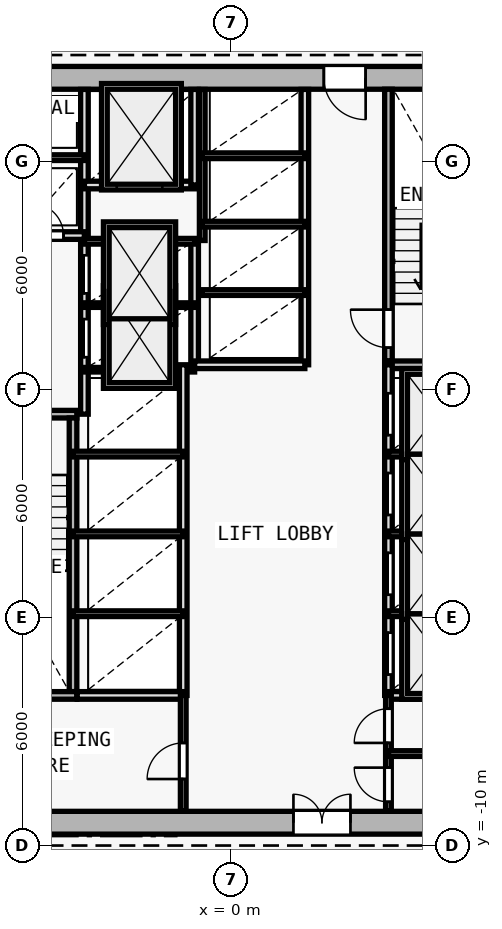
"""IFC4 building model, lengths in metres.
Left out: names, types, materials, properties, quantities, classifications, styles, units other than length and angle.
Written with IfcOpenShell. Run it as: python <this file> out.ifc"""

import sys

from ifc_helpers import new_model, si_unit, direction, frame, frame_2d, origin, origin_2d, place, context, subcontext, project, spatial, rectangle, i_section, extrude, element, fill, save


model = new_model("IFC4")
c1 = context("Model", 3, precision=1e-05, world=origin(), true_north=direction((0.0, 1.0)))
c2 = subcontext(c1, "Body", "Model", "MODEL_VIEW")
j1 = project(units=[si_unit("LENGTHUNIT", "METRE"), si_unit("PLANEANGLEUNIT", "RADIAN")], contexts=[c1])
p1 = place(None, origin())
s1 = spatial("IfcSite", under=j1, at=p1, CompositionType="ELEMENT")
p2 = place(p1, origin())
s2 = spatial("IfcBuilding", under=s1, at=p2, CompositionType="ELEMENT")
p3 = place(p2, frame((0.0, 0.0, 48.0)))
s3 = spatial("IfcBuildingStorey", under=s2, at=p3, CompositionType="ELEMENT", Elevation=48.0)
p4 = place(p3, frame((0.0, -9.4, 0.0), z_axis=(0.0, 0.0, 1.0), x_axis=(1.0, 0.0, 0.0)))
e1 = element("IfcColumn", 1, at=p4, inside=s3, PredefinedType="COLUMN", context=c2, shape_type="SweptSolid", body=[
    extrude(i_section(OverallWidth=0.416, OverallDepth=0.446, WebThickness=0.025, FlangeThickness=0.04, FilletRadius=0.015, at=origin_2d()), origin(), (0.0, 0.0, 1.0), 3.6),
])
p5 = place(p3, frame((-8.0, -9.4, 0.0), z_axis=(0.0, 0.0, 1.0), x_axis=(1.0, 0.0, 0.0)))
e2 = element("IfcWall", 2, at=p5, inside=s3, PredefinedType="SHEAR", context=c2, shape_type="SweptSolid", body=[
    extrude(rectangle(XDim=16.0, YDim=0.6, at=frame_2d((8.0, 0.0))), origin(), (0.0, 0.0, 1.0), 3.35),
])
p6 = place(p5, frame((9.65, 0.0, 0.0)))
e3 = element("IfcOpeningElement", 3, at=p6, cuts=e2, PredefinedType="OPENING", context=c2, shape_type="SweptSolid", body=[
    extrude(rectangle(XDim=1.5, YDim=2.2, at=frame_2d((0.75, 1.1))), frame((0.0, 0.31, 0.0), z_axis=(0.0, -1.0, 0.0), x_axis=(1.0, 0.0, 0.0)), (0.0, 0.0, 1.0), 0.62),
])
p7 = place(p3, frame((8.0, 10.2, 0.0), z_axis=(0.0, 0.0, 1.0), x_axis=(-1.0, 0.0, 0.0)))
e4 = element("IfcWall", 4, at=p7, inside=s3, PredefinedType="SHEAR", context=c2, shape_type="SweptSolid", body=[
    extrude(rectangle(XDim=16.0, YDim=0.6, at=frame_2d((8.0, 0.0))), origin(), (0.0, 0.0, 1.0), 3.35),
])
p8 = place(p7, frame((4.45, 0.0, 0.0)))
e5 = element("IfcOpeningElement", 5, at=p8, cuts=e4, PredefinedType="OPENING", context=c2, shape_type="SweptSolid", body=[
    extrude(rectangle(XDim=1.1, YDim=2.15, at=frame_2d((0.55, 1.075))), frame((0.0, 0.31, 0.0), z_axis=(0.0, -1.0, 0.0), x_axis=(1.0, 0.0, 0.0)), (0.0, 0.0, 1.0), 0.62),
])
p9 = place(p3, frame((-7.4, 1.35, 0.0), z_axis=(0.0, 0.0, 1.0), x_axis=(1.0, 0.0, 0.0)))
e6 = element("IfcWall", 6, at=p9, inside=s3, PredefinedType="SOLIDWALL", context=c2, shape_type="SweptSolid", body=[
    extrude(rectangle(XDim=3.35, YDim=0.2, at=frame_2d((1.675, 0.0))), origin(), (0.0, 0.0, 1.0), 3.35),
])
p10 = place(p9, frame((0.65, 0.0, 0.0)))
e7 = element("IfcOpeningElement", 7, at=p10, cuts=e6, PredefinedType="OPENING", context=c2, shape_type="SweptSolid", body=[
    extrude(rectangle(XDim=1.0, YDim=2.15, at=frame_2d((0.5, 1.075))), frame((0.0, 0.11, 0.0), z_axis=(0.0, -1.0, 0.0), x_axis=(1.0, 0.0, 0.0)), (0.0, 0.0, 1.0), 0.22),
])
p11 = place(p3, frame((-4.15, -5.95, 0.0), z_axis=(0.0, 0.0, 1.0), x_axis=(0.0, 1.0, 0.0)))
e8 = element("IfcWall", 8, at=p11, inside=s3, PredefinedType="SOLIDWALL", context=c2, shape_type="SweptSolid", body=[
    extrude(rectangle(XDim=7.2, YDim=0.2, at=frame_2d((3.6, 0.0))), origin(), (0.0, 0.0, 1.0), 3.35),
])
p12 = place(p3, frame((-3.85, 1.35, 0.0), z_axis=(0.0, 0.0, 1.0), x_axis=(0.0, 1.0, 0.0)))
e9 = element("IfcWall", 9, at=p12, inside=s3, PredefinedType="SOLIDWALL", context=c2, shape_type="SweptSolid", body=[
    extrude(rectangle(XDim=8.545, YDim=0.2, at=frame_2d((4.272, 0.0))), origin(), (0.0, 0.0, 1.0), 3.35),
])
p13 = place(p12, frame((1.5, 0.0, 0.0)))
e10 = element("IfcOpeningElement", 10, at=p13, cuts=e9, PredefinedType="OPENING", context=c2, shape_type="SweptSolid", body=[
    extrude(rectangle(XDim=1.0, YDim=2.15, at=frame_2d((0.5, 1.075))), frame((0.0, 0.11, 0.0), z_axis=(0.0, -1.0, 0.0), x_axis=(1.0, 0.0, 0.0)), (0.0, 0.0, 1.0), 0.22),
])
p14 = place(p12, frame((3.18, 0.0, 0.0)))
e11 = element("IfcOpeningElement", 11, at=p14, cuts=e9, PredefinedType="OPENING", context=c2, shape_type="SweptSolid", body=[
    extrude(rectangle(XDim=1.0, YDim=2.15, at=frame_2d((0.5, 1.075))), frame((0.0, 0.11, 0.0), z_axis=(0.0, -1.0, 0.0), x_axis=(1.0, 0.0, 0.0)), (0.0, 0.0, 1.0), 0.22),
])
p15 = place(p3, frame((-7.395, 6.05, 0.0), z_axis=(0.0, 0.0, 1.0), x_axis=(1.0, 0.0, 0.0)))
e12 = element("IfcWall", 12, at=p15, inside=s3, PredefinedType="SOLIDWALL", context=c2, shape_type="SweptSolid", body=[
    extrude(rectangle(XDim=3.545, YDim=0.2, at=frame_2d((1.772, 0.0))), origin(), (0.0, 0.0, 1.0), 3.35),
])
p16 = place(p15, frame((0.345, 0.0, 0.0)))
e13 = element("IfcOpeningElement", 13, at=p16, cuts=e12, PredefinedType="OPENING", context=c2, shape_type="SweptSolid", body=[
    extrude(rectangle(XDim=0.85, YDim=2.1, at=frame_2d((0.425, 1.05))), frame((0.0, 0.11, 0.0), z_axis=(0.0, -1.0, 0.0), x_axis=(1.0, 0.0, 0.0)), (0.0, 0.0, 1.0), 0.22),
])
p17 = place(p15, frame((2.145, 0.0, 0.0)))
e14 = element("IfcOpeningElement", 14, at=p17, cuts=e12, PredefinedType="OPENING", context=c2, shape_type="SweptSolid", body=[
    extrude(rectangle(XDim=0.85, YDim=2.1, at=frame_2d((0.425, 1.05))), frame((0.0, 0.11, 0.0), z_axis=(0.0, -1.0, 0.0), x_axis=(1.0, 0.0, 0.0)), (0.0, 0.0, 1.0), 0.22),
])
p18 = place(p3, frame((-7.395, 8.1, 0.0), z_axis=(0.0, 0.0, 1.0), x_axis=(1.0, 0.0, 0.0)))
e15 = element("IfcWall", 15, at=p18, inside=s3, PredefinedType="PARTITIONING", context=c2, shape_type="SweptSolid", body=[
    extrude(rectangle(XDim=3.545, YDim=0.15, at=frame_2d((1.772, 0.0))), origin(), (0.0, 0.0, 1.0), 3.35),
])
p19 = place(p3, frame((4.15, 2.75, 0.0), z_axis=(0.0, 0.0, 1.0), x_axis=(0.0, 1.0, 0.0)))
e16 = element("IfcWall", 16, at=p19, inside=s3, PredefinedType="SOLIDWALL", context=c2, shape_type="SweptSolid", body=[
    extrude(rectangle(XDim=7.15, YDim=0.2, at=frame_2d((3.575, 0.0))), origin(), (0.0, 0.0, 1.0), 3.35),
])
p20 = place(p19, frame((0.35, 0.0, 0.0)))
e17 = element("IfcOpeningElement", 17, at=p20, cuts=e16, PredefinedType="OPENING", context=c2, shape_type="SweptSolid", body=[
    extrude(rectangle(XDim=1.0, YDim=2.15, at=frame_2d((0.5, 1.075))), frame((0.0, 0.11, 0.0), z_axis=(0.0, -1.0, 0.0), x_axis=(1.0, 0.0, 0.0)), (0.0, 0.0, 1.0), 0.22),
])
p21 = place(p3, frame((4.05, 2.65, 0.0), z_axis=(0.0, 0.0, 1.0), x_axis=(1.0, 0.0, 0.0)))
e18 = element("IfcWall", 18, at=p21, inside=s3, PredefinedType="SOLIDWALL", context=c2, shape_type="SweptSolid", body=[
    extrude(rectangle(XDim=3.35, YDim=0.2, at=frame_2d((1.675, 0.0))), origin(), (0.0, 0.0, 1.0), 3.35),
])
p22 = place(p3, frame((-0.95, 2.65, 0.0), z_axis=(0.0, 0.0, 1.0), x_axis=(0.0, 1.0, 0.0)))
e19 = element("IfcWall", 19, at=p22, inside=s3, PredefinedType="SOLIDWALL", context=c2, shape_type="SweptSolid", body=[
    extrude(rectangle(XDim=3.27, YDim=0.2, at=frame_2d((1.635, 0.0))), origin(), (0.0, 0.0, 1.0), 3.35),
])
for number, where, z_axis, x_axis in (
    (20, (-3.85, 2.52, 0.0), (0.0, 0.0, 1.0), (1.0, 0.0, 0.0)),
    (21, (-3.85, 4.22, 0.0), (0.0, 0.0, 1.0), (1.0, 0.0, 0.0)),
):
    element("IfcWall", number, at=place(p3, frame(where, z_axis=z_axis, x_axis=x_axis)), inside=s3, PredefinedType="PARTITIONING", context=c2, shape_type="SweptSolid", body=[
        extrude(rectangle(XDim=2.9, YDim=0.12, at=frame_2d((1.45, 0.0))), origin(), (0.0, 0.0, 1.0), 3.35),
    ])
p23 = place(p3, frame((-3.85, 5.9, 0.0), z_axis=(0.0, 0.0, 1.0), x_axis=(1.0, 0.0, 0.0)))
e22 = element("IfcWall", 22, at=p23, inside=s3, PredefinedType="PARTITIONING", context=c2, shape_type="SweptSolid", body=[
    extrude(rectangle(XDim=2.9, YDim=0.15, at=frame_2d((1.45, 0.0))), origin(), (0.0, 0.0, 1.0), 3.35),
])
p24 = place(p3, frame((-3.85, 7.38, 0.0), z_axis=(0.0, 0.0, 1.0), x_axis=(1.0, 0.0, 0.0)))
e23 = element("IfcWall", 23, at=p24, inside=s3, PredefinedType="SOLIDWALL", context=c2, shape_type="SweptSolid", body=[
    extrude(rectangle(XDim=2.9, YDim=0.2, at=frame_2d((1.45, 0.0))), origin(), (0.0, 0.0, 1.0), 3.35),
])
p25 = place(p24, frame((0.85, 0.0, 0.0)))
e24 = element("IfcOpeningElement", 24, at=p25, cuts=e23, PredefinedType="OPENING", context=c2, shape_type="SweptSolid", body=[
    extrude(rectangle(XDim=1.2, YDim=2.2, at=frame_2d((0.6, 1.1))), frame((0.0, 0.11, 0.0), z_axis=(0.0, -1.0, 0.0), x_axis=(1.0, 0.0, 0.0)), (0.0, 0.0, 1.0), 0.22),
])
p26 = place(p3, frame((-0.95, 7.38, 0.0), z_axis=(0.0, 0.0, 1.0), x_axis=(0.0, 1.0, 0.0)))
e25 = element("IfcWall", 25, at=p26, inside=s3, PredefinedType="SOLIDWALL", context=c2, shape_type="SweptSolid", body=[
    extrude(rectangle(XDim=2.515, YDim=0.2, at=frame_2d((1.258, 0.0))), origin(), (0.0, 0.0, 1.0), 3.35),
])
p27 = place(p3, frame((4.15, -6.05, 0.0), z_axis=(0.0, 0.0, 1.0), x_axis=(0.0, 1.0, 0.0)))
e26 = element("IfcWall", 26, at=p27, inside=s3, PredefinedType="SOLIDWALL", context=c2, shape_type="SweptSolid", body=[
    extrude(rectangle(XDim=8.7, YDim=0.2, at=frame_2d((4.35, 0.0))), origin(), (0.0, 0.0, 1.0), 3.35),
])
p28 = place(p27, frame((0.55, 0.0, 0.0)))
e27 = element("IfcOpeningElement", 27, at=p28, cuts=e26, PredefinedType="OPENING", context=c2, shape_type="SweptSolid", body=[
    extrude(rectangle(XDim=1.1, YDim=2.15, at=frame_2d((0.55, 1.075))), frame((0.0, 0.11, 0.0), z_axis=(0.0, -1.0, 0.0), x_axis=(1.0, 0.0, 0.0)), (0.0, 0.0, 1.0), 0.22),
])
p29 = place(p27, frame((2.65, 0.0, 0.0)))
e28 = element("IfcOpeningElement", 28, at=p29, cuts=e26, PredefinedType="OPENING", context=c2, shape_type="SweptSolid", body=[
    extrude(rectangle(XDim=1.1, YDim=2.15, at=frame_2d((0.55, 1.075))), frame((0.0, 0.11, 0.0), z_axis=(0.0, -1.0, 0.0), x_axis=(1.0, 0.0, 0.0)), (0.0, 0.0, 1.0), 0.22),
])
p30 = place(p27, frame((4.75, 0.0, 0.0)))
e29 = element("IfcOpeningElement", 29, at=p30, cuts=e26, PredefinedType="OPENING", context=c2, shape_type="SweptSolid", body=[
    extrude(rectangle(XDim=1.1, YDim=2.15, at=frame_2d((0.55, 1.075))), frame((0.0, 0.11, 0.0), z_axis=(0.0, -1.0, 0.0), x_axis=(1.0, 0.0, 0.0)), (0.0, 0.0, 1.0), 0.22),
])
p31 = place(p27, frame((6.85, 0.0, 0.0)))
e30 = element("IfcOpeningElement", 30, at=p31, cuts=e26, PredefinedType="OPENING", context=c2, shape_type="SweptSolid", body=[
    extrude(rectangle(XDim=1.1, YDim=2.15, at=frame_2d((0.55, 1.075))), frame((0.0, 0.11, 0.0), z_axis=(0.0, -1.0, 0.0), x_axis=(1.0, 0.0, 0.0)), (0.0, 0.0, 1.0), 0.22),
])
for number, where, z_axis, x_axis in (
    (31, (4.15, -3.9, 0.0), (0.0, 0.0, 1.0), (1.0, 0.0, 0.0)),
    (32, (4.15, -1.8, 0.0), (0.0, 0.0, 1.0), (1.0, 0.0, 0.0)),
    (33, (4.15, 0.3, 0.0), (0.0, 0.0, 1.0), (1.0, 0.0, 0.0)),
):
    element("IfcWall", number, at=place(p3, frame(where, z_axis=z_axis, x_axis=x_axis)), inside=s3, PredefinedType="PARTITIONING", context=c2, shape_type="SweptSolid", body=[
        extrude(rectangle(XDim=2.6, YDim=0.15, at=frame_2d((1.3, 0.0))), origin(), (0.0, 0.0, 1.0), 3.35),
    ])
p32 = place(p3, frame((-1.25, -6.05, 0.0), z_axis=(0.0, 0.0, 1.0), x_axis=(0.0, 1.0, 0.0)))
e34 = element("IfcWall", 34, at=p32, inside=s3, PredefinedType="SOLIDWALL", context=c2, shape_type="SweptSolid", body=[
    extrude(rectangle(XDim=8.7, YDim=0.2, at=frame_2d((4.35, 0.0))), origin(), (0.0, 0.0, 1.0), 3.35),
])
for number, where, z_axis, x_axis in (
    (35, (-4.15, -3.9, 0.0), (0.0, 0.0, 1.0), (1.0, 0.0, 0.0)),
    (36, (-4.15, -1.8, 0.0), (0.0, 0.0, 1.0), (1.0, 0.0, 0.0)),
    (37, (-4.15, 0.3, 0.0), (0.0, 0.0, 1.0), (1.0, 0.0, 0.0)),
):
    element("IfcWall", number, at=place(p3, frame(where, z_axis=z_axis, x_axis=x_axis)), inside=s3, PredefinedType="PARTITIONING", context=c2, shape_type="SweptSolid", body=[
        extrude(rectangle(XDim=2.9, YDim=0.15, at=frame_2d((1.45, 0.0))), origin(), (0.0, 0.0, 1.0), 3.35),
    ])
p33 = place(p3, frame((1.95, 2.65, 0.0), z_axis=(0.0, 0.0, 1.0), x_axis=(0.0, 1.0, 0.0)))
e38 = element("IfcWall", 38, at=p33, inside=s3, PredefinedType="SOLIDWALL", context=c2, shape_type="SweptSolid", body=[
    extrude(rectangle(XDim=7.245, YDim=0.2, at=frame_2d((3.623, 0.0))), origin(), (0.0, 0.0, 1.0), 3.35),
])
p34 = place(p3, frame((-0.95, 2.65, 0.0), z_axis=(0.0, 0.0, 1.0), x_axis=(1.0, 0.0, 0.0)))
e39 = element("IfcWall", 39, at=p34, inside=s3, PredefinedType="SOLIDWALL", context=c2, shape_type="SweptSolid", body=[
    extrude(rectangle(XDim=2.9, YDim=0.2, at=frame_2d((1.45, 0.0))), origin(), (0.0, 0.0, 1.0), 3.35),
])
p35 = place(p3, frame((-0.75, 5.92, 0.0), z_axis=(0.0, 0.0, 1.0), x_axis=(0.0, 1.0, 0.0)))
e40 = element("IfcWall", 40, at=p35, inside=s3, PredefinedType="PARTITIONING", context=c2, shape_type="SweptSolid", body=[
    extrude(rectangle(XDim=3.975, YDim=0.15, at=frame_2d((1.988, 0.0))), origin(), (0.0, 0.0, 1.0), 3.35),
])
for number, where, z_axis, x_axis in (
    (41, (-0.75, 4.55, 0.0), (0.0, 0.0, 1.0), (1.0, 0.0, 0.0)),
    (42, (-0.75, 6.35, 0.0), (0.0, 0.0, 1.0), (1.0, 0.0, 0.0)),
    (43, (-0.75, 8.15, 0.0), (0.0, 0.0, 1.0), (1.0, 0.0, 0.0)),
):
    element("IfcWall", number, at=place(p3, frame(where, z_axis=z_axis, x_axis=x_axis)), inside=s3, PredefinedType="PARTITIONING", context=c2, shape_type="SweptSolid", body=[
        extrude(rectangle(XDim=2.7, YDim=0.15, at=frame_2d((1.35, 0.0))), origin(), (0.0, 0.0, 1.0), 3.35),
    ])
p36 = place(p3, frame((-7.4, -6.05, 0.0), z_axis=(0.0, 0.0, 1.0), x_axis=(1.0, 0.0, 0.0)))
e44 = element("IfcWall", 44, at=p36, inside=s3, PredefinedType="SOLIDWALL", context=c2, shape_type="SweptSolid", body=[
    extrude(rectangle(XDim=3.35, YDim=0.2, at=frame_2d((1.675, 0.0))), origin(), (0.0, 0.0, 1.0), 3.35),
])
p37 = place(p3, frame((-4.04, -6.05, 0.0), z_axis=(0.0, 0.0, 1.0), x_axis=(1.0, 0.0, 0.0)))
e45 = element("IfcWall", 45, at=p37, inside=s3, PredefinedType="SOLIDWALL", context=c2, shape_type="SweptSolid", body=[
    extrude(rectangle(XDim=2.79, YDim=0.2, at=frame_2d((1.395, 0.0))), origin(), (0.0, 0.0, 1.0), 3.35),
])
p38 = place(p3, frame((4.15, -6.05, 0.0), z_axis=(0.0, 0.0, 1.0), x_axis=(1.0, 0.0, 0.0)))
e46 = element("IfcWall", 46, at=p38, inside=s3, PredefinedType="SOLIDWALL", context=c2, shape_type="SweptSolid", body=[
    extrude(rectangle(XDim=3.245, YDim=0.2, at=frame_2d((1.623, 0.0))), origin(), (0.0, 0.0, 1.0), 3.35),
])
p39 = place(p3, frame((-1.25, -9.095, 0.0), z_axis=(0.0, 0.0, 1.0), x_axis=(0.0, 1.0, 0.0)))
e47 = element("IfcWall", 47, at=p39, inside=s3, PredefinedType="PARTITIONING", context=c2, shape_type="SweptSolid", body=[
    extrude(rectangle(XDim=3.045, YDim=0.15, at=frame_2d((1.522, 0.0))), origin(), (0.0, 0.0, 1.0), 3.35),
])
p40 = place(p39, frame((0.845, 0.0, 0.0)))
e48 = element("IfcOpeningElement", 48, at=p40, cuts=e47, PredefinedType="OPENING", context=c2, shape_type="SweptSolid", body=[
    extrude(rectangle(XDim=0.95, YDim=2.1, at=frame_2d((0.475, 1.05))), frame((0.0, 0.085, 0.0), z_axis=(0.0, -1.0, 0.0), x_axis=(1.0, 0.0, 0.0)), (0.0, 0.0, 1.0), 0.17),
])
p41 = place(p3, frame((4.15, -9.095, 0.0), z_axis=(0.0, 0.0, 1.0), x_axis=(0.0, 1.0, 0.0)))
e49 = element("IfcWall", 49, at=p41, inside=s3, PredefinedType="PARTITIONING", context=c2, shape_type="SweptSolid", body=[
    extrude(rectangle(XDim=3.045, YDim=0.15, at=frame_2d((1.522, 0.0))), origin(), (0.0, 0.0, 1.0), 3.35),
])
p42 = place(p41, frame((0.245, 0.0, 0.0)))
e50 = element("IfcOpeningElement", 50, at=p42, cuts=e49, PredefinedType="OPENING", context=c2, shape_type="SweptSolid", body=[
    extrude(rectangle(XDim=0.9, YDim=2.1, at=frame_2d((0.45, 1.05))), frame((0.0, 0.085, 0.0), z_axis=(0.0, -1.0, 0.0), x_axis=(1.0, 0.0, 0.0)), (0.0, 0.0, 1.0), 0.17),
])
p43 = place(p41, frame((1.795, 0.0, 0.0)))
e51 = element("IfcOpeningElement", 51, at=p43, cuts=e49, PredefinedType="OPENING", context=c2, shape_type="SweptSolid", body=[
    extrude(rectangle(XDim=0.9, YDim=2.1, at=frame_2d((0.45, 1.05))), frame((0.0, 0.085, 0.0), z_axis=(0.0, -1.0, 0.0), x_axis=(1.0, 0.0, 0.0)), (0.0, 0.0, 1.0), 0.17),
])
p44 = place(p3, frame((4.15, -7.58, 0.0), z_axis=(0.0, 0.0, 1.0), x_axis=(1.0, 0.0, 0.0)))
e52 = element("IfcWall", 52, at=p44, inside=s3, PredefinedType="PARTITIONING", context=c2, shape_type="SweptSolid", body=[
    extrude(rectangle(XDim=3.245, YDim=0.15, at=frame_2d((1.623, 0.0))), origin(), (0.0, 0.0, 1.0), 3.35),
])
p45 = place(p6, origin())
e53 = element("IfcDoor", 53, at=p45, inside=s3, OperationType="DOUBLE_DOOR_SINGLE_SWING", PredefinedType="DOOR", context=c2, shape_type="SweptSolid", body=[
    extrude(rectangle(XDim=1.5, YDim=2.2, at=frame_2d((0.75, 1.1))), frame((0.0, 0.025, 0.0), z_axis=(0.0, -1.0, 0.0), x_axis=(1.0, 0.0, 0.0)), (0.0, 0.0, 1.0), 0.05),
])
fill(e3, e53)
p46 = place(p8, origin())
e54 = element("IfcDoor", 54, at=p46, inside=s3, OperationType="SINGLE_SWING_LEFT", PredefinedType="DOOR", context=c2, shape_type="SweptSolid", body=[
    extrude(rectangle(XDim=1.1, YDim=2.15, at=frame_2d((0.55, 1.075))), frame((0.0, 0.025, 0.0), z_axis=(0.0, -1.0, 0.0), x_axis=(1.0, 0.0, 0.0)), (0.0, 0.0, 1.0), 0.05),
])
fill(e5, e54)
p47 = place(p17, origin())
e55 = element("IfcDoor", 55, at=p47, inside=s3, OperationType="SINGLE_SWING_LEFT", PredefinedType="DOOR", context=c2, shape_type="SweptSolid", body=[
    extrude(rectangle(XDim=0.85, YDim=2.1, at=frame_2d((0.425, 1.05))), frame((0.0, 0.025, 0.0), z_axis=(0.0, -1.0, 0.0), x_axis=(1.0, 0.0, 0.0)), (0.0, 0.0, 1.0), 0.05),
])
fill(e14, e55)
p48 = place(p20, origin())
e56 = element("IfcDoor", 56, at=p48, inside=s3, OperationType="SINGLE_SWING_RIGHT", PredefinedType="DOOR", context=c2, shape_type="SweptSolid", body=[
    extrude(rectangle(XDim=1.0, YDim=2.15, at=frame_2d((0.5, 1.075))), frame((0.0, 0.025, 0.0), z_axis=(0.0, -1.0, 0.0), x_axis=(1.0, 0.0, 0.0)), (0.0, 0.0, 1.0), 0.05),
])
fill(e17, e56)
p49 = place(p25, origin())
e57 = element("IfcDoor", 57, at=p49, inside=s3, OperationType="DOUBLE_DOOR_SLIDING", PredefinedType="DOOR", context=c2, shape_type="SweptSolid", body=[
    extrude(rectangle(XDim=1.2, YDim=2.2, at=frame_2d((0.6, 1.1))), frame((0.0, 0.025, 0.0), z_axis=(0.0, -1.0, 0.0), x_axis=(1.0, 0.0, 0.0)), (0.0, 0.0, 1.0), 0.05),
])
fill(e24, e57)
p50 = place(p28, origin())
e58 = element("IfcDoor", 58, at=p50, inside=s3, OperationType="DOUBLE_DOOR_SLIDING", PredefinedType="DOOR", context=c2, shape_type="SweptSolid", body=[
    extrude(rectangle(XDim=1.1, YDim=2.15, at=frame_2d((0.55, 1.075))), frame((0.0, 0.025, 0.0), z_axis=(0.0, -1.0, 0.0), x_axis=(1.0, 0.0, 0.0)), (0.0, 0.0, 1.0), 0.05),
])
fill(e27, e58)
p51 = place(p29, origin())
e59 = element("IfcDoor", 59, at=p51, inside=s3, OperationType="DOUBLE_DOOR_SLIDING", PredefinedType="DOOR", context=c2, shape_type="SweptSolid", body=[
    extrude(rectangle(XDim=1.1, YDim=2.15, at=frame_2d((0.55, 1.075))), frame((0.0, 0.025, 0.0), z_axis=(0.0, -1.0, 0.0), x_axis=(1.0, 0.0, 0.0)), (0.0, 0.0, 1.0), 0.05),
])
fill(e28, e59)
p52 = place(p30, origin())
e60 = element("IfcDoor", 60, at=p52, inside=s3, OperationType="DOUBLE_DOOR_SLIDING", PredefinedType="DOOR", context=c2, shape_type="SweptSolid", body=[
    extrude(rectangle(XDim=1.1, YDim=2.15, at=frame_2d((0.55, 1.075))), frame((0.0, 0.025, 0.0), z_axis=(0.0, -1.0, 0.0), x_axis=(1.0, 0.0, 0.0)), (0.0, 0.0, 1.0), 0.05),
])
fill(e29, e60)
p53 = place(p31, origin())
e61 = element("IfcDoor", 61, at=p53, inside=s3, OperationType="DOUBLE_DOOR_SLIDING", PredefinedType="DOOR", context=c2, shape_type="SweptSolid", body=[
    extrude(rectangle(XDim=1.1, YDim=2.15, at=frame_2d((0.55, 1.075))), frame((0.0, 0.025, 0.0), z_axis=(0.0, -1.0, 0.0), x_axis=(1.0, 0.0, 0.0)), (0.0, 0.0, 1.0), 0.05),
])
fill(e30, e61)
p54 = place(p13, origin())
e62 = element("IfcDoor", 62, at=p54, inside=s3, OperationType="DOUBLE_DOOR_SLIDING", PredefinedType="DOOR", context=c2, shape_type="SweptSolid", body=[
    extrude(rectangle(XDim=1.0, YDim=2.15, at=frame_2d((0.5, 1.075))), frame((0.0, 0.025, 0.0), z_axis=(0.0, -1.0, 0.0), x_axis=(1.0, 0.0, 0.0)), (0.0, 0.0, 1.0), 0.05),
])
fill(e10, e62)
p55 = place(p14, origin())
e63 = element("IfcDoor", 63, at=p55, inside=s3, OperationType="DOUBLE_DOOR_SLIDING", PredefinedType="DOOR", context=c2, shape_type="SweptSolid", body=[
    extrude(rectangle(XDim=1.0, YDim=2.15, at=frame_2d((0.5, 1.075))), frame((0.0, 0.025, 0.0), z_axis=(0.0, -1.0, 0.0), x_axis=(1.0, 0.0, 0.0)), (0.0, 0.0, 1.0), 0.05),
])
fill(e11, e63)
p56 = place(p40, origin())
e64 = element("IfcDoor", 64, at=p56, inside=s3, OperationType="SINGLE_SWING_LEFT", PredefinedType="DOOR", context=c2, shape_type="SweptSolid", body=[
    extrude(rectangle(XDim=0.95, YDim=2.1, at=frame_2d((0.475, 1.05))), frame((0.0, 0.025, 0.0), z_axis=(0.0, -1.0, 0.0), x_axis=(1.0, 0.0, 0.0)), (0.0, 0.0, 1.0), 0.05),
])
fill(e48, e64)
p57 = place(p42, origin())
e65 = element("IfcDoor", 65, at=p57, inside=s3, OperationType="SINGLE_SWING_RIGHT", PredefinedType="DOOR", context=c2, shape_type="SweptSolid", body=[
    extrude(rectangle(XDim=0.9, YDim=2.1, at=frame_2d((0.45, 1.05))), frame((0.0, 0.025, 0.0), z_axis=(0.0, -1.0, 0.0), x_axis=(1.0, 0.0, 0.0)), (0.0, 0.0, 1.0), 0.05),
])
fill(e50, e65)
p58 = place(p43, origin())
e66 = element("IfcDoor", 66, at=p58, inside=s3, OperationType="SINGLE_SWING_LEFT", PredefinedType="DOOR", context=c2, shape_type="SweptSolid", body=[
    extrude(rectangle(XDim=0.9, YDim=2.1, at=frame_2d((0.45, 1.05))), frame((0.0, 0.025, 0.0), z_axis=(0.0, -1.0, 0.0), x_axis=(1.0, 0.0, 0.0)), (0.0, 0.0, 1.0), 0.05),
])
fill(e51, e66)
save(model, sys.argv[1])
